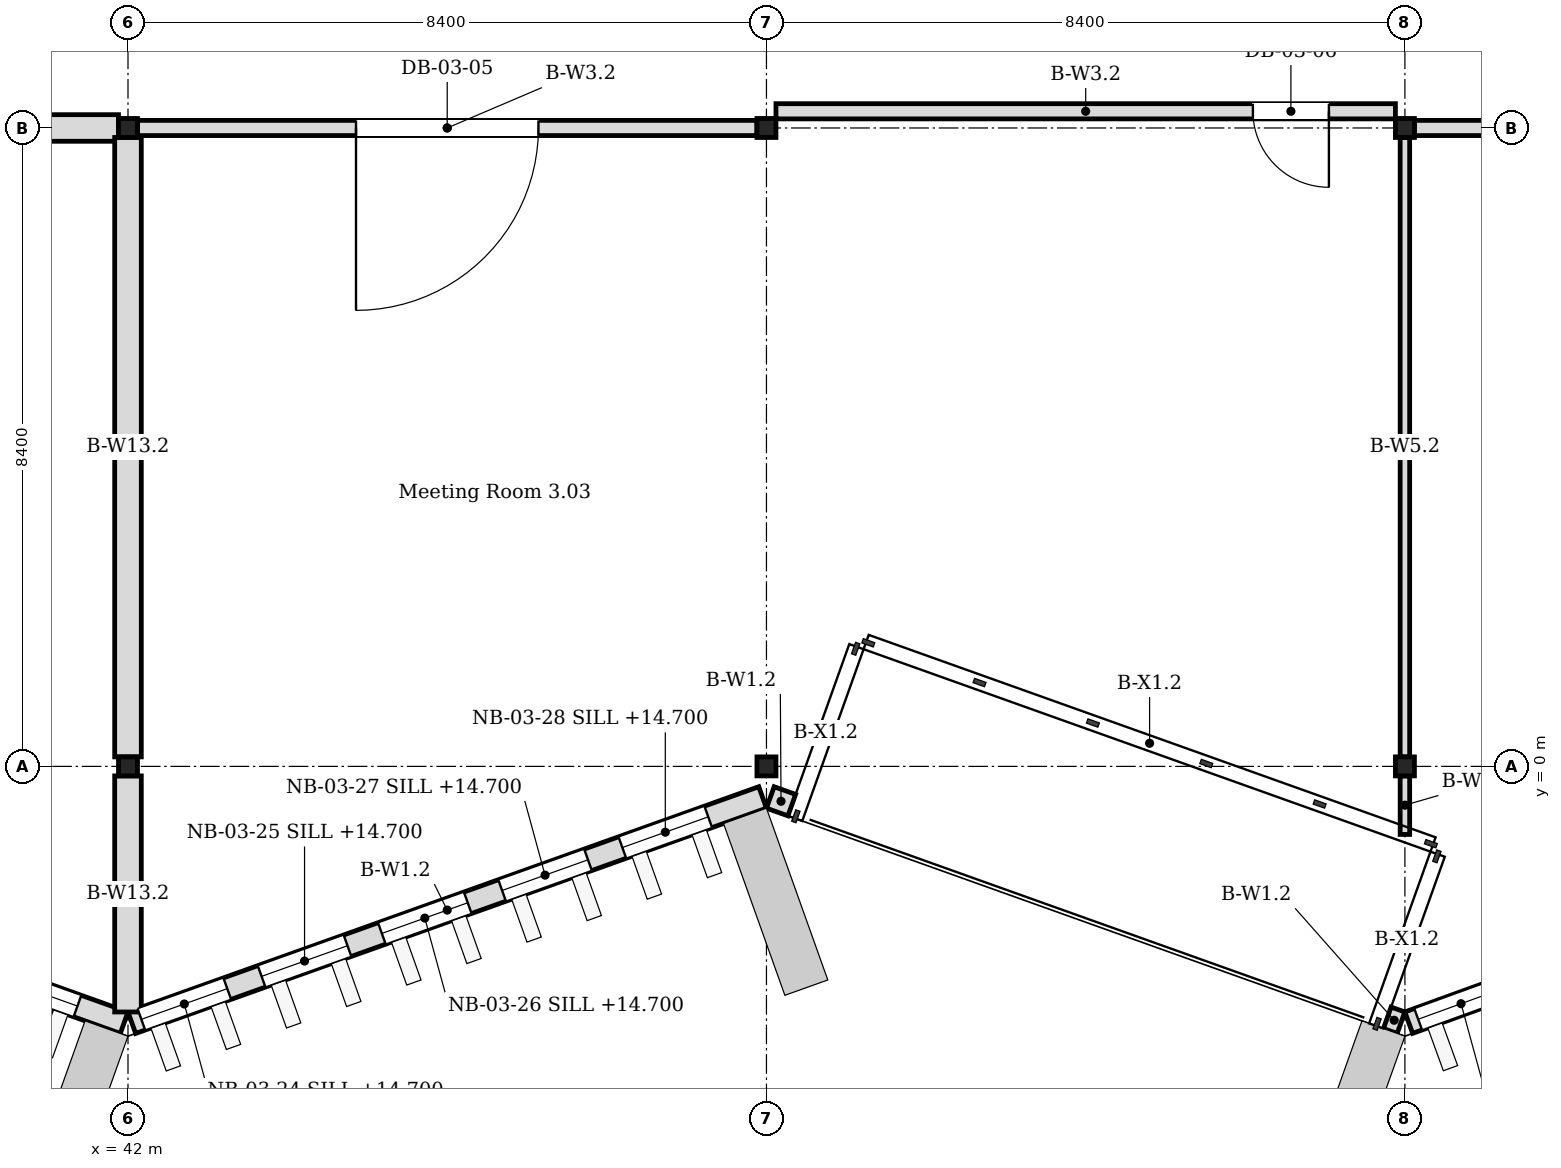
"""IFC4 building model, lengths in metres.
Left out: names, types, materials, properties, quantities, classifications, styles, units other than length and angle.
Written with IfcOpenShell. Run it as: python <this file> out.ifc"""

import sys

from ifc_helpers import new_model, si_unit, direction, frame, frame_2d, origin, origin_2d, place, context, subcontext, project, spatial, rectangle, i_section, extrude, element, fill, save


model = new_model("IFC4")
c1 = context("Model", 3, precision=1e-05, world=origin(), true_north=direction((0.0, 1.0)))
c2 = subcontext(c1, "Body", "Model", "MODEL_VIEW")
j1 = project(units=[si_unit("LENGTHUNIT", "METRE"), si_unit("PLANEANGLEUNIT", "RADIAN")], contexts=[c1])
p1 = place(None, origin())
s1 = spatial("IfcSite", under=j1, at=p1, CompositionType="ELEMENT")
p2 = place(p1, origin())
s2 = spatial("IfcBuilding", under=s1, at=p2, CompositionType="ELEMENT")
p3 = place(p2, frame((0.0, 0.0, 14.4)))
s3 = spatial("IfcBuildingStorey", under=s2, at=p3, CompositionType="ELEMENT", Elevation=14.4)
for number, where, z_axis, x_axis in (
    (1, (42.0, 0.0, 0.0), (0.0, 0.0, 1.0), (1.0, 0.0, 0.0)),
    (2, (42.0, 8.4, 0.0), (0.0, 0.0, 1.0), (1.0, 0.0, 0.0)),
    (3, (50.4, 0.0, 0.0), (0.0, 0.0, 1.0), (1.0, 0.0, 0.0)),
    (4, (50.4, 8.4, 0.0), (0.0, 0.0, 1.0), (1.0, 0.0, 0.0)),
    (5, (58.8, 0.0, 0.0), (0.0, 0.0, 1.0), (1.0, 0.0, 0.0)),
    (6, (58.8, 8.4, 0.0), (0.0, 0.0, 1.0), (1.0, 0.0, 0.0)),
):
    element("IfcColumn", number, at=place(p3, frame(where, z_axis=z_axis, x_axis=x_axis)), inside=s3, PredefinedType="COLUMN", context=c2, shape_type="SweptSolid", body=[
        extrude(i_section(OverallWidth=0.25, OverallDepth=0.25, WebThickness=0.009, FlangeThickness=0.014, FilletRadius=0.013, at=origin_2d()), origin(), (0.0, 0.0, 1.0), 3.95),
    ])
p4 = place(p3, frame((33.65, -0.409, 0.0), z_axis=(0.0, 0.0, 1.0), x_axis=(0.941736270411, -0.336352191894, 0.0)))
e7 = element("IfcWall", 7, at=p4, inside=s3, PredefinedType="SOLIDWALL", context=c2, shape_type="SweptSolid", body=[
    extrude(rectangle(XDim=8.812, YDim=0.3, at=frame_2d((4.406, 0.0))), origin(), (0.0, 0.0, 1.0), 3.95),
])
p5 = place(p4, frame((0.24, 0.0, 0.3)))
e8 = element("IfcOpeningElement", 8, at=p5, cuts=e7, PredefinedType="OPENING", context=c2, shape_type="SweptSolid", body=[
    extrude(rectangle(XDim=1.2, YDim=3.3, at=frame_2d((0.6, 1.65))), frame((0.0, 0.16, 0.0), z_axis=(0.0, -1.0, 0.0), x_axis=(1.0, 0.0, 0.0)), (0.0, 0.0, 1.0), 0.32),
])
p6 = place(p4, frame((1.92, 0.0, 0.3)))
e9 = element("IfcOpeningElement", 9, at=p6, cuts=e7, PredefinedType="OPENING", context=c2, shape_type="SweptSolid", body=[
    extrude(rectangle(XDim=1.2, YDim=3.3, at=frame_2d((0.6, 1.65))), frame((0.0, 0.16, 0.0), z_axis=(0.0, -1.0, 0.0), x_axis=(1.0, 0.0, 0.0)), (0.0, 0.0, 1.0), 0.32),
])
p7 = place(p4, frame((3.6, 0.0, 0.3)))
e10 = element("IfcOpeningElement", 10, at=p7, cuts=e7, PredefinedType="OPENING", context=c2, shape_type="SweptSolid", body=[
    extrude(rectangle(XDim=1.2, YDim=3.3, at=frame_2d((0.6, 1.65))), frame((0.0, 0.16, 0.0), z_axis=(0.0, -1.0, 0.0), x_axis=(1.0, 0.0, 0.0)), (0.0, 0.0, 1.0), 0.32),
])
p8 = place(p4, frame((5.28, 0.0, 0.3)))
e11 = element("IfcOpeningElement", 11, at=p8, cuts=e7, PredefinedType="OPENING", context=c2, shape_type="SweptSolid", body=[
    extrude(rectangle(XDim=1.2, YDim=3.3, at=frame_2d((0.6, 1.65))), frame((0.0, 0.16, 0.0), z_axis=(0.0, -1.0, 0.0), x_axis=(1.0, 0.0, 0.0)), (0.0, 0.0, 1.0), 0.32),
])
p9 = place(p4, frame((6.96, 0.0, 0.3)))
e12 = element("IfcOpeningElement", 12, at=p9, cuts=e7, PredefinedType="OPENING", context=c2, shape_type="SweptSolid", body=[
    extrude(rectangle(XDim=1.2, YDim=3.3, at=frame_2d((0.6, 1.65))), frame((0.0, 0.16, 0.0), z_axis=(0.0, -1.0, 0.0), x_axis=(1.0, 0.0, 0.0)), (0.0, 0.0, 1.0), 0.32),
])
p10 = place(p3, frame((42.051, -3.373, 0.0), z_axis=(0.0, 0.0, 1.0), x_axis=(0.941736270411, 0.336352191894, 0.0)))
e13 = element("IfcWall", 13, at=p10, inside=s3, PredefinedType="SOLIDWALL", context=c2, shape_type="SweptSolid", body=[
    extrude(rectangle(XDim=8.812, YDim=0.3, at=frame_2d((4.406, 0.0))), origin(), (0.0, 0.0, 1.0), 3.95),
])
p11 = place(p10, frame((0.133, 0.0, 0.3)))
e14 = element("IfcOpeningElement", 14, at=p11, cuts=e13, PredefinedType="OPENING", context=c2, shape_type="SweptSolid", body=[
    extrude(rectangle(XDim=1.2, YDim=3.3, at=frame_2d((0.6, 1.65))), frame((0.0, 0.16, 0.0), z_axis=(0.0, -1.0, 0.0), x_axis=(1.0, 0.0, 0.0)), (0.0, 0.0, 1.0), 0.32),
])
p12 = place(p10, frame((1.813, 0.0, 0.3)))
e15 = element("IfcOpeningElement", 15, at=p12, cuts=e13, PredefinedType="OPENING", context=c2, shape_type="SweptSolid", body=[
    extrude(rectangle(XDim=1.2, YDim=3.3, at=frame_2d((0.6, 1.65))), frame((0.0, 0.16, 0.0), z_axis=(0.0, -1.0, 0.0), x_axis=(1.0, 0.0, 0.0)), (0.0, 0.0, 1.0), 0.32),
])
p13 = place(p10, frame((3.493, 0.0, 0.3)))
e16 = element("IfcOpeningElement", 16, at=p13, cuts=e13, PredefinedType="OPENING", context=c2, shape_type="SweptSolid", body=[
    extrude(rectangle(XDim=1.2, YDim=3.3, at=frame_2d((0.6, 1.65))), frame((0.0, 0.16, 0.0), z_axis=(0.0, -1.0, 0.0), x_axis=(1.0, 0.0, 0.0)), (0.0, 0.0, 1.0), 0.32),
])
p14 = place(p10, frame((5.173, 0.0, 0.3)))
e17 = element("IfcOpeningElement", 17, at=p14, cuts=e13, PredefinedType="OPENING", context=c2, shape_type="SweptSolid", body=[
    extrude(rectangle(XDim=1.2, YDim=3.3, at=frame_2d((0.6, 1.65))), frame((0.0, 0.16, 0.0), z_axis=(0.0, -1.0, 0.0), x_axis=(1.0, 0.0, 0.0)), (0.0, 0.0, 1.0), 0.32),
])
p15 = place(p10, frame((6.853, 0.0, 0.3)))
e18 = element("IfcOpeningElement", 18, at=p15, cuts=e13, PredefinedType="OPENING", context=c2, shape_type="SweptSolid", body=[
    extrude(rectangle(XDim=1.2, YDim=3.3, at=frame_2d((0.6, 1.65))), frame((0.0, 0.16, 0.0), z_axis=(0.0, -1.0, 0.0), x_axis=(1.0, 0.0, 0.0)), (0.0, 0.0, 1.0), 0.32),
])
p16 = place(p3, frame((50.45, -0.409, 0.0), z_axis=(0.0, 0.0, 1.0), x_axis=(0.941797147708, -0.336181695768, 0.0)))
e19 = element("IfcWall", 19, at=p16, inside=s3, PredefinedType="SOLIDWALL", context=c2, shape_type="SweptSolid", body=[
    extrude(rectangle(XDim=0.3, YDim=0.3, at=frame_2d((0.15, 0.0))), origin(), (0.0, 0.0, 1.0), 3.95),
])
p17 = place(p3, frame((58.568, -3.308, 0.0), z_axis=(0.0, 0.0, 1.0), x_axis=(0.942000485661, -0.335611509061, 0.0)))
e20 = element("IfcWall", 20, at=p17, inside=s3, PredefinedType="SOLIDWALL", context=c2, shape_type="SweptSolid", body=[
    extrude(rectangle(XDim=0.192, YDim=0.3, at=frame_2d((0.096, 0.0))), origin(), (0.0, 0.0, 1.0), 3.95),
])
p18 = place(p3, frame((58.85, -3.372, 0.0), z_axis=(0.0, 0.0, 1.0), x_axis=(0.939953187971, 0.341303390584, 0.0)))
e21 = element("IfcWall", 21, at=p18, inside=s3, PredefinedType="SOLIDWALL", context=c2, shape_type="SweptSolid", body=[
    extrude(rectangle(XDim=8.828, YDim=0.3, at=frame_2d((4.414, 0.0))), origin(), (0.0, 0.0, 1.0), 3.95),
])
p19 = place(p18, frame((0.132, 0.0, 0.3)))
e22 = element("IfcOpeningElement", 22, at=p19, cuts=e21, PredefinedType="OPENING", context=c2, shape_type="SweptSolid", body=[
    extrude(rectangle(XDim=1.2, YDim=3.3, at=frame_2d((0.6, 1.65))), frame((0.0, 0.16, 0.0), z_axis=(0.0, -1.0, 0.0), x_axis=(1.0, 0.0, 0.0)), (0.0, 0.0, 1.0), 0.32),
])
p20 = place(p18, frame((1.812, 0.0, 0.3)))
e23 = element("IfcOpeningElement", 23, at=p20, cuts=e21, PredefinedType="OPENING", context=c2, shape_type="SweptSolid", body=[
    extrude(rectangle(XDim=1.2, YDim=3.3, at=frame_2d((0.6, 1.65))), frame((0.0, 0.16, 0.0), z_axis=(0.0, -1.0, 0.0), x_axis=(1.0, 0.0, 0.0)), (0.0, 0.0, 1.0), 0.32),
])
p21 = place(p18, frame((3.492, 0.0, 0.3)))
e24 = element("IfcOpeningElement", 24, at=p21, cuts=e21, PredefinedType="OPENING", context=c2, shape_type="SweptSolid", body=[
    extrude(rectangle(XDim=1.2, YDim=3.3, at=frame_2d((0.6, 1.65))), frame((0.0, 0.16, 0.0), z_axis=(0.0, -1.0, 0.0), x_axis=(1.0, 0.0, 0.0)), (0.0, 0.0, 1.0), 0.32),
])
p22 = place(p18, frame((5.172, 0.0, 0.3)))
e25 = element("IfcOpeningElement", 25, at=p22, cuts=e21, PredefinedType="OPENING", context=c2, shape_type="SweptSolid", body=[
    extrude(rectangle(XDim=1.2, YDim=3.3, at=frame_2d((0.6, 1.65))), frame((0.0, 0.16, 0.0), z_axis=(0.0, -1.0, 0.0), x_axis=(1.0, 0.0, 0.0)), (0.0, 0.0, 1.0), 0.32),
])
p23 = place(p18, frame((6.852, 0.0, 0.3)))
e26 = element("IfcOpeningElement", 26, at=p23, cuts=e21, PredefinedType="OPENING", context=c2, shape_type="SweptSolid", body=[
    extrude(rectangle(XDim=1.2, YDim=3.3, at=frame_2d((0.6, 1.65))), frame((0.0, 0.16, 0.0), z_axis=(0.0, -1.0, 0.0), x_axis=(1.0, 0.0, 0.0)), (0.0, 0.0, 1.0), 0.32),
])
p24 = place(p3, frame((33.725, 8.4, 0.0), z_axis=(0.0, 0.0, 1.0), x_axis=(1.0, 0.0, 0.0)))
e27 = element("IfcWall", 27, at=p24, inside=s3, PredefinedType="PARTITIONING", context=c2, shape_type="SweptSolid", body=[
    extrude(rectangle(XDim=8.15, YDim=0.35, at=frame_2d((4.075, 0.0))), origin(), (0.0, 0.0, 1.0), 3.25),
])
p25 = place(p24, frame((3.525, 0.0, 0.0)))
e28 = element("IfcOpeningElement", 28, at=p25, cuts=e27, PredefinedType="OPENING", context=c2, shape_type="SweptSolid", body=[
    extrude(rectangle(XDim=1.1, YDim=2.4, at=frame_2d((0.55, 1.2))), frame((0.0, 0.185, 0.0), z_axis=(0.0, -1.0, 0.0), x_axis=(1.0, 0.0, 0.0)), (0.0, 0.0, 1.0), 0.37),
])
p26 = place(p3, frame((42.125, 8.4, 0.0), z_axis=(0.0, 0.0, 1.0), x_axis=(1.0, 0.0, 0.0)))
e29 = element("IfcWall", 29, at=p26, inside=s3, PredefinedType="PARTITIONING", context=c2, shape_type="SweptSolid", body=[
    extrude(rectangle(XDim=8.15, YDim=0.2, at=frame_2d((4.075, 0.0))), origin(), (0.0, 0.0, 1.0), 3.25),
])
p27 = place(p26, frame((2.875, 0.0, 0.0)))
e30 = element("IfcOpeningElement", 30, at=p27, cuts=e29, PredefinedType="OPENING", context=c2, shape_type="SweptSolid", body=[
    extrude(rectangle(XDim=2.4, YDim=2.2, at=frame_2d((1.2, 1.1))), frame((0.0, 0.11, 0.0), z_axis=(0.0, -1.0, 0.0), x_axis=(1.0, 0.0, 0.0)), (0.0, 0.0, 1.0), 0.22),
])
p28 = place(p3, frame((50.525, 8.619, 0.0), z_axis=(0.0, 0.0, 1.0), x_axis=(1.0, 0.0, 0.0)))
e31 = element("IfcWall", 31, at=p28, inside=s3, PredefinedType="PARTITIONING", context=c2, shape_type="SweptSolid", body=[
    extrude(rectangle(XDim=8.15, YDim=0.2, at=frame_2d((4.075, 0.0))), origin(), (0.0, 0.0, 1.0), 3.25),
])
p29 = place(p28, frame((6.275, 0.0, 0.0)))
e32 = element("IfcOpeningElement", 32, at=p29, cuts=e31, PredefinedType="OPENING", context=c2, shape_type="SweptSolid", body=[
    extrude(rectangle(XDim=1.0, YDim=2.1, at=frame_2d((0.5, 1.05))), frame((0.0, 0.11, 0.0), z_axis=(0.0, -1.0, 0.0), x_axis=(1.0, 0.0, 0.0)), (0.0, 0.0, 1.0), 0.22),
])
p30 = place(p3, frame((58.925, 8.4, 0.0), z_axis=(0.0, 0.0, 1.0), x_axis=(1.0, 0.0, 0.0)))
e33 = element("IfcWall", 33, at=p30, inside=s3, PredefinedType="PARTITIONING", context=c2, shape_type="SweptSolid", body=[
    extrude(rectangle(XDim=8.15, YDim=0.2, at=frame_2d((4.075, 0.0))), origin(), (0.0, 0.0, 1.0), 3.25),
])
p31 = place(p30, frame((2.875, 0.0, 0.0)))
e34 = element("IfcOpeningElement", 34, at=p31, cuts=e33, PredefinedType="OPENING", context=c2, shape_type="SweptSolid", body=[
    extrude(rectangle(XDim=2.4, YDim=2.2, at=frame_2d((1.2, 1.1))), frame((0.0, 0.11, 0.0), z_axis=(0.0, -1.0, 0.0), x_axis=(1.0, 0.0, 0.0)), (0.0, 0.0, 1.0), 0.22),
])
p32 = place(p3, frame((42.0, -3.231, 0.0), z_axis=(0.0, 0.0, 1.0), x_axis=(0.0, 1.0, 0.0)))
e35 = element("IfcWall", 35, at=p32, inside=s3, PredefinedType="PARTITIONING", context=c2, shape_type="SweptSolid", body=[
    extrude(rectangle(XDim=3.106, YDim=0.35, at=frame_2d((1.553, 0.0))), origin(), (0.0, 0.0, 1.0), 3.25),
])
p33 = place(p3, frame((42.0, 0.125, 0.0), z_axis=(0.0, 0.0, 1.0), x_axis=(0.0, 1.0, 0.0)))
e36 = element("IfcWall", 36, at=p33, inside=s3, PredefinedType="PARTITIONING", context=c2, shape_type="SweptSolid", body=[
    extrude(rectangle(XDim=8.15, YDim=0.35, at=frame_2d((4.075, 0.0))), origin(), (0.0, 0.0, 1.0), 3.25),
])
p34 = place(p3, frame((58.8, -0.895, 0.0), z_axis=(0.0, 0.0, 1.0), x_axis=(0.0, 1.0, 0.0)))
e37 = element("IfcWall", 37, at=p34, inside=s3, PredefinedType="MOVABLE", context=c2, shape_type="SweptSolid", body=[
    extrude(rectangle(XDim=0.77, YDim=0.125, at=frame_2d((0.385, 0.0))), origin(), (0.0, 0.0, 1.0), 3.25),
])
p35 = place(p3, frame((58.8, 0.125, 0.0), z_axis=(0.0, 0.0, 1.0), x_axis=(0.0, 1.0, 0.0)))
e38 = element("IfcWall", 38, at=p35, inside=s3, PredefinedType="MOVABLE", context=c2, shape_type="SweptSolid", body=[
    extrude(rectangle(XDim=8.15, YDim=0.125, at=frame_2d((4.075, 0.0))), origin(), (0.0, 0.0, 1.0), 3.25),
])
p36 = place(p9, origin())
e39 = element("IfcWindow", 39, at=p36, inside=s3, PartitioningType="TRIPLE_PANEL_VERTICAL", PredefinedType="WINDOW", context=c2, shape_type="SweptSolid", body=[
    extrude(rectangle(XDim=1.2, YDim=3.3, at=frame_2d((0.6, 1.65))), frame((0.0, 0.03, 0.0), z_axis=(0.0, -1.0, 0.0), x_axis=(1.0, 0.0, 0.0)), (0.0, 0.0, 1.0), 0.06),
])
fill(e12, e39)
p37 = place(p11, origin())
e40 = element("IfcWindow", 40, at=p37, inside=s3, PartitioningType="TRIPLE_PANEL_VERTICAL", PredefinedType="WINDOW", context=c2, shape_type="SweptSolid", body=[
    extrude(rectangle(XDim=1.2, YDim=3.3, at=frame_2d((0.6, 1.65))), frame((0.0, 0.03, 0.0), z_axis=(0.0, -1.0, 0.0), x_axis=(1.0, 0.0, 0.0)), (0.0, 0.0, 1.0), 0.06),
])
fill(e14, e40)
p38 = place(p12, origin())
e41 = element("IfcWindow", 41, at=p38, inside=s3, PartitioningType="TRIPLE_PANEL_VERTICAL", PredefinedType="WINDOW", context=c2, shape_type="SweptSolid", body=[
    extrude(rectangle(XDim=1.2, YDim=3.3, at=frame_2d((0.6, 1.65))), frame((0.0, 0.03, 0.0), z_axis=(0.0, -1.0, 0.0), x_axis=(1.0, 0.0, 0.0)), (0.0, 0.0, 1.0), 0.06),
])
fill(e15, e41)
p39 = place(p13, origin())
e42 = element("IfcWindow", 42, at=p39, inside=s3, PartitioningType="TRIPLE_PANEL_VERTICAL", PredefinedType="WINDOW", context=c2, shape_type="SweptSolid", body=[
    extrude(rectangle(XDim=1.2, YDim=3.3, at=frame_2d((0.6, 1.65))), frame((0.0, 0.03, 0.0), z_axis=(0.0, -1.0, 0.0), x_axis=(1.0, 0.0, 0.0)), (0.0, 0.0, 1.0), 0.06),
])
fill(e16, e42)
p40 = place(p14, origin())
e43 = element("IfcWindow", 43, at=p40, inside=s3, PartitioningType="TRIPLE_PANEL_VERTICAL", PredefinedType="WINDOW", context=c2, shape_type="SweptSolid", body=[
    extrude(rectangle(XDim=1.2, YDim=3.3, at=frame_2d((0.6, 1.65))), frame((0.0, 0.03, 0.0), z_axis=(0.0, -1.0, 0.0), x_axis=(1.0, 0.0, 0.0)), (0.0, 0.0, 1.0), 0.06),
])
fill(e17, e43)
p41 = place(p15, origin())
e44 = element("IfcWindow", 44, at=p41, inside=s3, PartitioningType="TRIPLE_PANEL_VERTICAL", PredefinedType="WINDOW", context=c2, shape_type="SweptSolid", body=[
    extrude(rectangle(XDim=1.2, YDim=3.3, at=frame_2d((0.6, 1.65))), frame((0.0, 0.03, 0.0), z_axis=(0.0, -1.0, 0.0), x_axis=(1.0, 0.0, 0.0)), (0.0, 0.0, 1.0), 0.06),
])
fill(e18, e44)
p42 = place(p19, origin())
e45 = element("IfcWindow", 45, at=p42, inside=s3, PartitioningType="TRIPLE_PANEL_VERTICAL", PredefinedType="WINDOW", context=c2, shape_type="SweptSolid", body=[
    extrude(rectangle(XDim=1.2, YDim=3.3, at=frame_2d((0.6, 1.65))), frame((0.0, 0.03, 0.0), z_axis=(0.0, -1.0, 0.0), x_axis=(1.0, 0.0, 0.0)), (0.0, 0.0, 1.0), 0.06),
])
fill(e22, e45)
p43 = place(p27, origin())
e46 = element("IfcDoor", 46, at=p43, inside=s3, OperationType="DOUBLE_DOOR_SINGLE_SWING", PredefinedType="DOOR", context=c2, shape_type="SweptSolid", body=[
    extrude(rectangle(XDim=2.4, YDim=2.2, at=frame_2d((1.2, 1.1))), frame((0.0, 0.025, 0.0), z_axis=(0.0, -1.0, 0.0), x_axis=(1.0, 0.0, 0.0)), (0.0, 0.0, 1.0), 0.05),
])
fill(e30, e46)
p44 = place(p29, origin())
e47 = element("IfcDoor", 47, at=p44, inside=s3, OperationType="SINGLE_SWING_LEFT", PredefinedType="DOOR", context=c2, shape_type="SweptSolid", body=[
    extrude(rectangle(XDim=1.0, YDim=2.1, at=frame_2d((0.5, 1.05))), frame((0.0, 0.025, 0.0), z_axis=(0.0, -1.0, 0.0), x_axis=(1.0, 0.0, 0.0)), (0.0, 0.0, 1.0), 0.05),
])
fill(e32, e47)
save(model, sys.argv[1])
